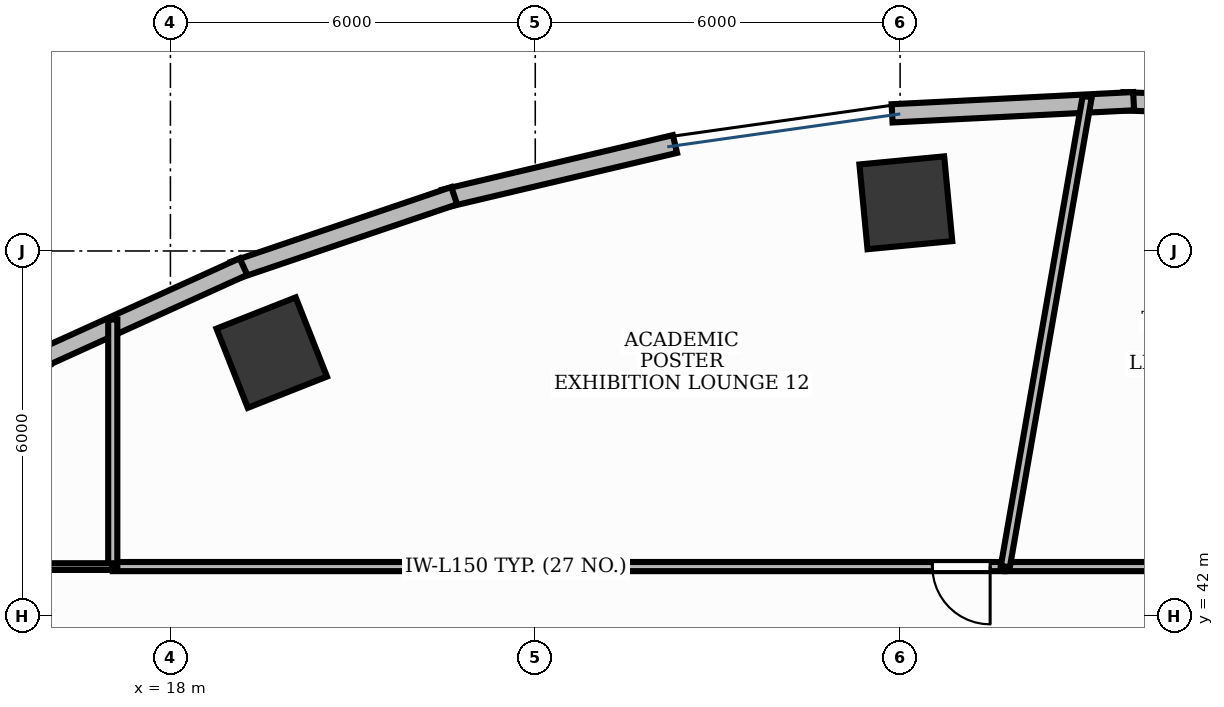
"""IFC4 building model, lengths in metres.
Left out: names, types, materials, properties, quantities, classifications, styles, units other than length and angle.
Written with IfcOpenShell. Run it as: python <this file> out.ifc"""

import sys

from ifc_helpers import new_model, si_unit, direction, frame, frame_2d, origin, origin_2d, place, context, subcontext, project, spatial, rectangle, extrude, element, fill, save


model = new_model("IFC4")
c1 = context("Model", 3, precision=1e-05, world=origin(), true_north=direction((0.0, 1.0)))
c2 = subcontext(c1, "Body", "Model", "MODEL_VIEW")
j1 = project(units=[si_unit("LENGTHUNIT", "METRE"), si_unit("PLANEANGLEUNIT", "RADIAN")], contexts=[c1])
p1 = place(None, origin())
s1 = spatial("IfcSite", under=j1, at=p1, CompositionType="ELEMENT")
p2 = place(p1, origin())
s2 = spatial("IfcBuilding", under=s1, at=p2, CompositionType="ELEMENT")
p3 = place(p2, frame((0.0, 0.0, 5.4)))
s3 = spatial("IfcBuildingStorey", under=s2, at=p3, CompositionType="ELEMENT", Elevation=5.4)
for number, where, z_axis, x_axis in (
    (1, (30.094, 48.792, -0.0), (0.0, 0.0, 1.0), (0.995, 0.095, 0.0)),
    (2, (19.667, 46.329, -0.0), (0.0, 0.0, 1.0), (0.93, 0.367, 0.0)),
):
    element("IfcColumn", number, at=place(p3, frame(where, z_axis=z_axis, x_axis=x_axis)), inside=s3, PredefinedType="COLUMN", context=c2, shape_type="SweptSolid", body=[
        extrude(rectangle(XDim=1.4, YDim=1.4, at=origin_2d()), origin(), (0.0, 0.0, 1.0), 4.501),
    ])
p4 = place(p3, frame((37.644, 50.308, 0.0), z_axis=(0.0, 0.0, 1.0), x_axis=(-0.999245411623, 0.038840794937, 0.0)))
e3 = element("IfcWall", 3, at=p4, inside=s3, PredefinedType="STANDARD", context=c2, shape_type="SweptSolid", body=[
    extrude(rectangle(XDim=3.979, YDim=0.3, at=frame_2d((1.989, 0.0))), origin(), (0.0, 0.0, 1.0), 4.5),
])
p5 = place(p3, frame((33.84, 50.463, 0.0), z_axis=(0.0, 0.0, 1.0), x_axis=(-0.998732359232, -0.050335619826, 0.0)))
e4 = element("IfcWall", 4, at=p5, inside=s3, PredefinedType="STANDARD", context=c2, shape_type="SweptSolid", body=[
    extrude(rectangle(XDim=3.977, YDim=0.3, at=frame_2d((1.989, 0.0))), origin(), (0.0, 0.0, 1.0), 4.5),
])
p6 = place(p3, frame((26.297, 49.759, 0.0), z_axis=(0.0, 0.0, 1.0), x_axis=(-0.973197600754, -0.229970497863, 0.0)))
e5 = element("IfcWall", 5, at=p6, inside=s3, PredefinedType="STANDARD", context=c2, shape_type="SweptSolid", body=[
    extrude(rectangle(XDim=3.901, YDim=0.3, at=frame_2d((1.951, 0.0))), origin(), (0.0, 0.0, 1.0), 4.5),
])
p7 = place(p3, frame((22.667, 48.909, 0.0), z_axis=(0.0, 0.0, 1.0), x_axis=(-0.94702579403, -0.321157508773, 0.0)))
e6 = element("IfcWall", 6, at=p7, inside=s3, PredefinedType="STANDARD", context=c2, shape_type="SweptSolid", body=[
    extrude(rectangle(XDim=3.83, YDim=0.3, at=frame_2d((1.915, 0.0))), origin(), (0.0, 0.0, 1.0), 4.5),
])
p8 = place(p3, frame((19.201, 47.743, 0.0), z_axis=(0.0, 0.0, 1.0), x_axis=(-0.910623406862, -0.413237233166, 0.0)))
e7 = element("IfcWall", 7, at=p8, inside=s3, PredefinedType="STANDARD", context=c2, shape_type="SweptSolid", body=[
    extrude(rectangle(XDim=3.74, YDim=0.3, at=frame_2d((1.87, 0.0))), origin(), (0.0, 0.0, 1.0), 4.5),
])
p9 = place(p3, frame((38.442, 42.81, 0.0), z_axis=(0.0, 0.0, 1.0), x_axis=(-1.0, 0.0, 0.0)))
e8 = element("IfcWall", 8, at=p9, inside=s3, PredefinedType="PARTITIONING", context=c2, shape_type="SweptSolid", body=[
    extrude(rectangle(XDim=6.711, YDim=0.15, at=frame_2d((3.356, 0.0))), origin(), (0.0, 0.0, 1.0), 3.51),
])
p10 = place(p9, frame((2.879, 0.0, 0.0)))
e9 = element("IfcOpeningElement", 9, at=p10, cuts=e8, PredefinedType="OPENING", context=c2, shape_type="SweptSolid", body=[
    extrude(rectangle(XDim=0.95, YDim=2.15, at=frame_2d((0.475, 1.075))), frame((0.0, 0.09, 0.0), z_axis=(0.0, -1.0, 0.0), x_axis=(1.0, 0.0, 0.0)), (0.0, 0.0, 1.0), 0.18),
])
p11 = place(p3, frame((31.721, 42.81, 0.0), z_axis=(0.0, 0.0, 1.0), x_axis=(-1.0, 0.0, 0.0)))
e10 = element("IfcWall", 10, at=p11, inside=s3, PredefinedType="PARTITIONING", context=c2, shape_type="SweptSolid", body=[
    extrude(rectangle(XDim=14.669, YDim=0.15, at=frame_2d((7.334, 0.0))), origin(), (0.0, 0.0, 1.0), 3.51),
])
p12 = place(p11, frame((0.24, 0.0, 0.0)))
e11 = element("IfcOpeningElement", 11, at=p12, cuts=e10, PredefinedType="OPENING", context=c2, shape_type="SweptSolid", body=[
    extrude(rectangle(XDim=0.95, YDim=2.15, at=frame_2d((0.475, 1.075))), frame((0.0, 0.09, 0.0), z_axis=(0.0, -1.0, 0.0), x_axis=(1.0, 0.0, 0.0)), (0.0, 0.0, 1.0), 0.18),
])
p13 = place(p3, frame((31.73, 42.81, 0.0), z_axis=(0.0, 0.0, 1.0), x_axis=(0.171661622949, 0.985155971005, 0.0)))
e12 = element("IfcWall", 12, at=p13, inside=s3, PredefinedType="PARTITIONING", context=c2, shape_type="SweptSolid", body=[
    extrude(rectangle(XDim=7.845, YDim=0.15, at=frame_2d((3.922, 0.0))), origin(), (0.0, 0.0, 1.0), 3.51),
])
p14 = place(p3, frame((17.052, 42.81, 0.0), z_axis=(0.0, 0.0, 1.0), x_axis=(0.0, 1.0, 0.0)))
e13 = element("IfcWall", 13, at=p14, inside=s3, PredefinedType="PARTITIONING", context=c2, shape_type="SweptSolid", body=[
    extrude(rectangle(XDim=4.063, YDim=0.15, at=frame_2d((2.031, 0.0))), origin(), (0.0, 0.0, 1.0), 3.51),
])
p15 = place(p3, frame((17.042, 42.81, 0.0), z_axis=(0.0, 0.0, 1.0), x_axis=(-1.0, 0.0, 0.0)))
e14 = element("IfcWall", 14, at=p15, inside=s3, PredefinedType="MOVABLE", context=c2, shape_type="SweptSolid", body=[
    extrude(rectangle(XDim=1.524, YDim=0.11, at=frame_2d((0.762, 0.0))), origin(), (0.0, 0.0, 1.0), 3.51),
])
p16 = place(p12, origin())
e15 = element("IfcDoor", 15, at=p16, inside=s3, OperationType="SINGLE_SWING_LEFT", PredefinedType="DOOR", context=c2, shape_type="SweptSolid", body=[
    extrude(rectangle(XDim=0.95, YDim=2.15, at=frame_2d((0.475, 1.075))), frame((0.0, 0.025, 0.0), z_axis=(0.0, -1.0, 0.0), x_axis=(1.0, 0.0, 0.0)), (0.0, 0.0, 1.0), 0.05),
])
fill(e11, e15)
save(model, sys.argv[1])
